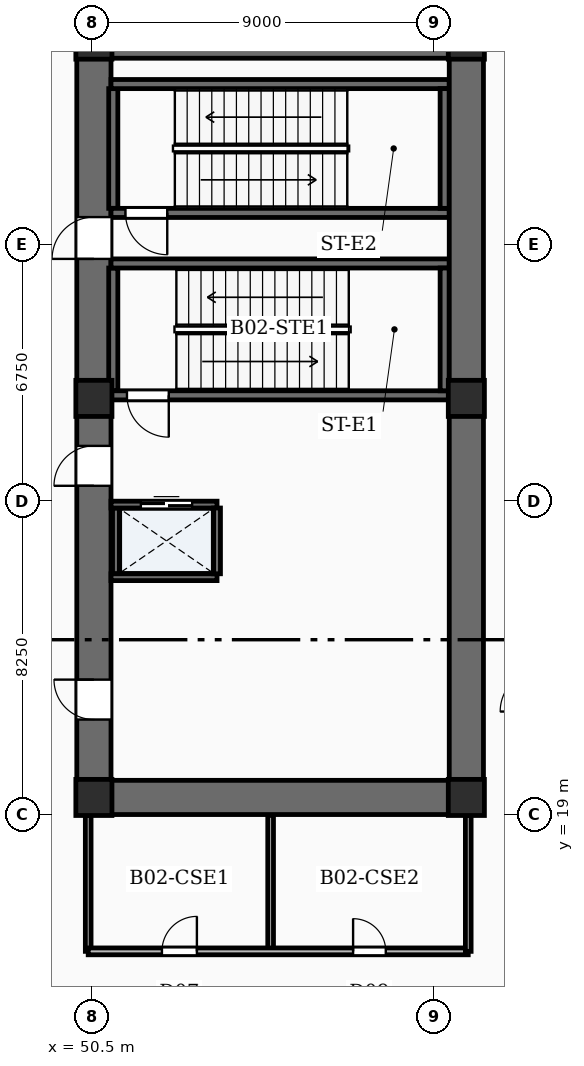
"""IFC4 building model, lengths in metres.
Left out: names, types, materials, properties, quantities, classifications, styles, units other than length and angle.
Written with IfcOpenShell. Run it as: python <this file> out.ifc"""

import sys

from ifc_helpers import new_model, si_unit, direction, frame, frame_2d, origin, origin_2d, place, context, subcontext, project, spatial, rectangle, extrude, element, fill, save


model = new_model("IFC4")
c1 = context("Model", 3, precision=1e-05, world=origin(), true_north=direction((0.0, 1.0)))
c2 = subcontext(c1, "Body", "Model", "MODEL_VIEW")
j1 = project(units=[si_unit("LENGTHUNIT", "METRE"), si_unit("PLANEANGLEUNIT", "RADIAN")], contexts=[c1])
p1 = place(None, origin())
s1 = spatial("IfcSite", under=j1, at=p1, CompositionType="ELEMENT")
p2 = place(p1, origin())
s2 = spatial("IfcBuilding", under=s1, at=p2, CompositionType="ELEMENT")
p3 = place(p2, frame((0.0, 0.0, -10.0)))
s3 = spatial("IfcBuildingStorey", under=s2, at=p3, CompositionType="ELEMENT", Elevation=-10.0)
p4 = place(p3, frame((50.55, 19.0, -0.85), z_axis=(0.0, 0.0, 1.0), x_axis=(0.0, 1.0, 0.0)))
e1 = element("IfcWall", 1, at=p4, inside=s3, PredefinedType="SHEAR", context=c2, shape_type="SweptSolid", body=[
    extrude(rectangle(XDim=20.8, YDim=0.9, at=frame_2d((10.4, 0.0))), origin(), (0.0, 0.0, 1.0), 5.54),
])
p5 = place(p4, frame((2.5, 0.0, 0.85)))
e2 = element("IfcOpeningElement", 2, at=p5, cuts=e1, PredefinedType="OPENING", context=c2, shape_type="SweptSolid", body=[
    extrude(rectangle(XDim=1.05, YDim=2.15, at=frame_2d((0.525, 1.075))), frame((0.0, 0.46, 0.0), z_axis=(0.0, -1.0, 0.0), x_axis=(1.0, 0.0, 0.0)), (0.0, 0.0, 1.0), 0.92),
])
p6 = place(p4, frame((8.65, 0.0, 0.85)))
e3 = element("IfcOpeningElement", 3, at=p6, cuts=e1, PredefinedType="OPENING", context=c2, shape_type="SweptSolid", body=[
    extrude(rectangle(XDim=1.05, YDim=2.15, at=frame_2d((0.525, 1.075))), frame((0.0, 0.46, 0.0), z_axis=(0.0, -1.0, 0.0), x_axis=(1.0, 0.0, 0.0)), (0.0, 0.0, 1.0), 0.92),
])
p7 = place(p4, frame((14.62, 0.0, 0.85)))
e4 = element("IfcOpeningElement", 4, at=p7, cuts=e1, PredefinedType="OPENING", context=c2, shape_type="SweptSolid", body=[
    extrude(rectangle(XDim=1.1, YDim=2.15, at=frame_2d((0.55, 1.075))), frame((0.0, 0.46, 0.0), z_axis=(0.0, -1.0, 0.0), x_axis=(1.0, 0.0, 0.0)), (0.0, 0.0, 1.0), 0.92),
])
p8 = place(p3, frame((60.35, 19.0, -0.85), z_axis=(0.0, 0.0, 1.0), x_axis=(0.0, 1.0, 0.0)))
e5 = element("IfcWall", 5, at=p8, inside=s3, PredefinedType="SHEAR", context=c2, shape_type="SweptSolid", body=[
    extrude(rectangle(XDim=20.8, YDim=0.9, at=frame_2d((10.4, 0.0))), origin(), (0.0, 0.0, 1.0), 5.54),
])
for number, where, z_axis, x_axis in (
    (6, (51.0, 19.45, -0.85), (0.0, 0.0, 1.0), (1.0, 0.0, 0.0)),
    (7, (51.0, 39.35, -0.85), (0.0, 0.0, 1.0), (1.0, 0.0, 0.0)),
):
    element("IfcWall", number, at=place(p3, frame(where, z_axis=z_axis, x_axis=x_axis)), inside=s3, PredefinedType="SHEAR", context=c2, shape_type="SweptSolid", body=[
        extrude(rectangle(XDim=8.9, YDim=0.9, at=frame_2d((4.45, 0.0))), origin(), (0.0, 0.0, 1.0), 5.54),
    ])
for number, where, z_axis, x_axis in (
    (8, (50.55, 19.45, -0.85), (0.0, 0.0, 1.0), (1.0, 0.0, 0.0)),
    (9, (60.35, 19.45, -0.85), (0.0, 0.0, 1.0), (1.0, 0.0, 0.0)),
    (10, (50.55, 29.95, -0.85), (0.0, 0.0, 1.0), (1.0, 0.0, 0.0)),
    (11, (60.35, 29.95, -0.85), (0.0, 0.0, 1.0), (1.0, 0.0, 0.0)),
    (12, (50.55, 39.35, -0.85), (0.0, 0.0, 1.0), (1.0, 0.0, 0.0)),
    (13, (60.35, 39.35, -0.85), (0.0, 0.0, 1.0), (1.0, 0.0, 0.0)),
):
    element("IfcColumn", number, at=place(p3, frame(where, z_axis=z_axis, x_axis=x_axis)), inside=s3, PredefinedType="COLUMN", context=c2, shape_type="SweptSolid", body=[
        extrude(rectangle(XDim=0.95, YDim=0.95, at=origin_2d()), origin(), (0.0, 0.0, 1.0), 5.54),
    ])
p9 = place(p3, frame((59.9, 30.03, 0.0), z_axis=(0.0, 0.0, 1.0), x_axis=(-1.0, 0.0, 0.0)))
e14 = element("IfcWall", 14, at=p9, inside=s3, PredefinedType="SOLIDWALL", context=c2, shape_type="SweptSolid", body=[
    extrude(rectangle(XDim=8.9, YDim=0.24, at=frame_2d((4.45, 0.0))), origin(), (0.0, 0.0, 1.0), 4.69),
])
p10 = place(p9, frame((7.38, 0.0, 0.0)))
e15 = element("IfcOpeningElement", 15, at=p10, cuts=e14, PredefinedType="OPENING", context=c2, shape_type="SweptSolid", body=[
    extrude(rectangle(XDim=1.1, YDim=2.15, at=frame_2d((0.55, 1.075))), frame((0.0, 0.13, 0.0), z_axis=(0.0, -1.0, 0.0), x_axis=(1.0, 0.0, 0.0)), (0.0, 0.0, 1.0), 0.26),
])
p11 = place(p3, frame((51.0, 33.5, 0.0), z_axis=(0.0, 0.0, 1.0), x_axis=(1.0, 0.0, 0.0)))
e16 = element("IfcWall", 16, at=p11, inside=s3, PredefinedType="SOLIDWALL", context=c2, shape_type="SweptSolid", body=[
    extrude(rectangle(XDim=8.9, YDim=0.24, at=frame_2d((4.45, 0.0))), origin(), (0.0, 0.0, 1.0), 4.69),
])
for number, where, z_axis, x_axis in (
    (17, (51.06, 30.15, 0.0), (0.0, 0.0, 1.0), (0.0, 1.0, 0.0)),
    (18, (59.78, 30.15, 0.0), (0.0, 0.0, 1.0), (0.0, 1.0, 0.0)),
):
    element("IfcWall", number, at=place(p3, frame(where, z_axis=z_axis, x_axis=x_axis)), inside=s3, PredefinedType="SOLIDWALL", context=c2, shape_type="SweptSolid", body=[
        extrude(rectangle(XDim=3.23, YDim=0.24, at=frame_2d((1.615, 0.0))), origin(), (0.0, 0.0, 1.0), 4.69),
    ])
p12 = place(p3, frame((59.9, 34.83, 0.0), z_axis=(0.0, 0.0, 1.0), x_axis=(-1.0, 0.0, 0.0)))
e19 = element("IfcWall", 19, at=p12, inside=s3, PredefinedType="SOLIDWALL", context=c2, shape_type="SweptSolid", body=[
    extrude(rectangle(XDim=8.9, YDim=0.24, at=frame_2d((4.45, 0.0))), origin(), (0.0, 0.0, 1.0), 4.69),
])
p13 = place(p12, frame((7.42, 0.0, 0.0)))
e20 = element("IfcOpeningElement", 20, at=p13, cuts=e19, PredefinedType="OPENING", context=c2, shape_type="SweptSolid", body=[
    extrude(rectangle(XDim=1.1, YDim=2.15, at=frame_2d((0.55, 1.075))), frame((0.0, 0.13, 0.0), z_axis=(0.0, -1.0, 0.0), x_axis=(1.0, 0.0, 0.0)), (0.0, 0.0, 1.0), 0.26),
])
p14 = place(p3, frame((51.0, 38.22, 0.0), z_axis=(0.0, 0.0, 1.0), x_axis=(1.0, 0.0, 0.0)))
e21 = element("IfcWall", 21, at=p14, inside=s3, PredefinedType="SOLIDWALL", context=c2, shape_type="SweptSolid", body=[
    extrude(rectangle(XDim=8.9, YDim=0.24, at=frame_2d((4.45, 0.0))), origin(), (0.0, 0.0, 1.0), 4.69),
])
for number, where, z_axis, x_axis in (
    (22, (51.06, 34.95, 0.0), (0.0, 0.0, 1.0), (0.0, 1.0, 0.0)),
    (23, (59.78, 34.95, 0.0), (0.0, 0.0, 1.0), (0.0, 1.0, 0.0)),
):
    element("IfcWall", number, at=place(p3, frame(where, z_axis=z_axis, x_axis=x_axis)), inside=s3, PredefinedType="SOLIDWALL", context=c2, shape_type="SweptSolid", body=[
        extrude(rectangle(XDim=3.15, YDim=0.24, at=frame_2d((1.575, 0.0))), origin(), (0.0, 0.0, 1.0), 4.69),
    ])
p15 = place(p3, frame((51.0, 27.155, 0.0), z_axis=(0.0, 0.0, 1.0), x_axis=(1.0, 0.0, 0.0)))
e24 = element("IfcWall", 24, at=p15, inside=s3, PredefinedType="SOLIDWALL", context=c2, shape_type="SweptSolid", body=[
    extrude(rectangle(XDim=2.79, YDim=0.18, at=frame_2d((1.395, 0.0))), origin(), (0.0, 0.0, 1.0), 4.69),
])
p16 = place(p15, frame((0.785, 0.0, 0.0)))
e25 = element("IfcOpeningElement", 25, at=p16, cuts=e24, PredefinedType="OPENING", context=c2, shape_type="SweptSolid", body=[
    extrude(rectangle(XDim=1.35, YDim=2.3, at=frame_2d((0.675, 1.15))), frame((0.0, 0.1, 0.0), z_axis=(0.0, -1.0, 0.0), x_axis=(1.0, 0.0, 0.0)), (0.0, 0.0, 1.0), 0.2),
])
p17 = place(p3, frame((51.0, 25.245, 0.0), z_axis=(0.0, 0.0, 1.0), x_axis=(1.0, 0.0, 0.0)))
e26 = element("IfcWall", 26, at=p17, inside=s3, PredefinedType="SOLIDWALL", context=c2, shape_type="SweptSolid", body=[
    extrude(rectangle(XDim=2.79, YDim=0.18, at=frame_2d((1.395, 0.0))), origin(), (0.0, 0.0, 1.0), 4.69),
])
for number, where, z_axis, x_axis in (
    (27, (51.13, 25.335, 0.0), (0.0, 0.0, 1.0), (0.0, 1.0, 0.0)),
    (28, (53.79, 25.335, 0.0), (0.0, 0.0, 1.0), (0.0, 1.0, 0.0)),
):
    element("IfcWall", number, at=place(p3, frame(where, z_axis=z_axis, x_axis=x_axis)), inside=s3, PredefinedType="SOLIDWALL", context=c2, shape_type="SweptSolid", body=[
        extrude(rectangle(XDim=1.73, YDim=0.18, at=frame_2d((0.865, 0.0))), origin(), (0.0, 0.0, 1.0), 4.69),
    ])
p18 = place(p3, frame((55.2, 15.4, 0.0), z_axis=(0.0, 0.0, 1.0), x_axis=(0.0, 1.0, 0.0)))
e29 = element("IfcWall", 29, at=p18, inside=s3, PredefinedType="PARTITIONING", context=c2, shape_type="SweptSolid", body=[
    extrude(rectangle(XDim=3.58, YDim=0.15, at=frame_2d((1.79, 0.0))), origin(), (0.0, 0.0, 1.0), 3.75),
])
p19 = place(p3, frame((50.4, 15.4, 0.0), z_axis=(0.0, 0.0, 1.0), x_axis=(1.0, 0.0, 0.0)))
e30 = element("IfcWall", 30, at=p19, inside=s3, PredefinedType="SOLIDWALL", context=c2, shape_type="SweptSolid", body=[
    extrude(rectangle(XDim=10.0, YDim=0.18, at=frame_2d((5.0, 0.0))), origin(), (0.0, 0.0, 1.0), 3.75),
])
p20 = place(p19, frame((1.94, 0.0, 0.0)))
e31 = element("IfcOpeningElement", 31, at=p20, cuts=e30, PredefinedType="OPENING", context=c2, shape_type="SweptSolid", body=[
    extrude(rectangle(XDim=0.92, YDim=2.1, at=frame_2d((0.46, 1.05))), frame((0.0, 0.1, 0.0), z_axis=(0.0, -1.0, 0.0), x_axis=(1.0, 0.0, 0.0)), (0.0, 0.0, 1.0), 0.2),
])
p21 = place(p19, frame((6.97, 0.0, 0.0)))
e32 = element("IfcOpeningElement", 32, at=p21, cuts=e30, PredefinedType="OPENING", context=c2, shape_type="SweptSolid", body=[
    extrude(rectangle(XDim=0.86, YDim=2.05, at=frame_2d((0.43, 1.025))), frame((0.0, 0.1, 0.0), z_axis=(0.0, -1.0, 0.0), x_axis=(1.0, 0.0, 0.0)), (0.0, 0.0, 1.0), 0.2),
])
for number, where, z_axis, x_axis in (
    (33, (50.4, 15.4, 0.0), (0.0, 0.0, 1.0), (0.0, 1.0, 0.0)),
    (34, (60.4, 15.4, 0.0), (0.0, 0.0, 1.0), (0.0, 1.0, 0.0)),
):
    element("IfcWall", number, at=place(p3, frame(where, z_axis=z_axis, x_axis=x_axis)), inside=s3, PredefinedType="PARTITIONING", context=c2, shape_type="SweptSolid", body=[
        extrude(rectangle(XDim=3.58, YDim=0.15, at=frame_2d((1.79, 0.0))), origin(), (0.0, 0.0, 1.0), 3.75),
    ])
p22 = place(p5, origin())
e35 = element("IfcDoor", 35, at=p22, inside=s3, OperationType="SINGLE_SWING_RIGHT", PredefinedType="DOOR", context=c2, shape_type="SweptSolid", body=[
    extrude(rectangle(XDim=1.05, YDim=2.15, at=frame_2d((0.525, 1.075))), frame((0.0, 0.025, 0.0), z_axis=(0.0, -1.0, 0.0), x_axis=(1.0, 0.0, 0.0)), (0.0, 0.0, 1.0), 0.05),
])
fill(e2, e35)
p23 = place(p6, origin())
e36 = element("IfcDoor", 36, at=p23, inside=s3, OperationType="SINGLE_SWING_LEFT", PredefinedType="DOOR", context=c2, shape_type="SweptSolid", body=[
    extrude(rectangle(XDim=1.05, YDim=2.15, at=frame_2d((0.525, 1.075))), frame((0.0, 0.025, 0.0), z_axis=(0.0, -1.0, 0.0), x_axis=(1.0, 0.0, 0.0)), (0.0, 0.0, 1.0), 0.05),
])
fill(e3, e36)
p24 = place(p7, origin())
e37 = element("IfcDoor", 37, at=p24, inside=s3, OperationType="SINGLE_SWING_LEFT", PredefinedType="DOOR", context=c2, shape_type="SweptSolid", body=[
    extrude(rectangle(XDim=1.1, YDim=2.15, at=frame_2d((0.55, 1.075))), frame((0.0, 0.025, 0.0), z_axis=(0.0, -1.0, 0.0), x_axis=(1.0, 0.0, 0.0)), (0.0, 0.0, 1.0), 0.05),
])
fill(e4, e37)
p25 = place(p10, origin())
e38 = element("IfcDoor", 38, at=p25, inside=s3, OperationType="SINGLE_SWING_LEFT", PredefinedType="DOOR", context=c2, shape_type="SweptSolid", body=[
    extrude(rectangle(XDim=1.1, YDim=2.15, at=frame_2d((0.55, 1.075))), frame((0.0, 0.025, 0.0), z_axis=(0.0, -1.0, 0.0), x_axis=(1.0, 0.0, 0.0)), (0.0, 0.0, 1.0), 0.05),
])
fill(e15, e38)
p26 = place(p13, origin())
e39 = element("IfcDoor", 39, at=p26, inside=s3, OperationType="SINGLE_SWING_LEFT", PredefinedType="DOOR", context=c2, shape_type="SweptSolid", body=[
    extrude(rectangle(XDim=1.1, YDim=2.15, at=frame_2d((0.55, 1.075))), frame((0.0, 0.025, 0.0), z_axis=(0.0, -1.0, 0.0), x_axis=(1.0, 0.0, 0.0)), (0.0, 0.0, 1.0), 0.05),
])
fill(e20, e39)
p27 = place(p16, origin())
e40 = element("IfcDoor", 40, at=p27, inside=s3, OperationType="DOUBLE_DOOR_SLIDING", PredefinedType="DOOR", context=c2, shape_type="SweptSolid", body=[
    extrude(rectangle(XDim=1.35, YDim=2.3, at=frame_2d((0.675, 1.15))), frame((0.0, 0.025, 0.0), z_axis=(0.0, -1.0, 0.0), x_axis=(1.0, 0.0, 0.0)), (0.0, 0.0, 1.0), 0.05),
])
fill(e25, e40)
p28 = place(p20, origin())
e41 = element("IfcDoor", 41, at=p28, inside=s3, OperationType="SINGLE_SWING_RIGHT", PredefinedType="DOOR", context=c2, shape_type="SweptSolid", body=[
    extrude(rectangle(XDim=0.92, YDim=2.1, at=frame_2d((0.46, 1.05))), frame((0.0, 0.025, 0.0), z_axis=(0.0, -1.0, 0.0), x_axis=(1.0, 0.0, 0.0)), (0.0, 0.0, 1.0), 0.05),
])
fill(e31, e41)
p29 = place(p21, origin())
e42 = element("IfcDoor", 42, at=p29, inside=s3, OperationType="SINGLE_SWING_LEFT", PredefinedType="DOOR", context=c2, shape_type="SweptSolid", body=[
    extrude(rectangle(XDim=0.86, YDim=2.05, at=frame_2d((0.43, 1.025))), frame((0.0, 0.025, 0.0), z_axis=(0.0, -1.0, 0.0), x_axis=(1.0, 0.0, 0.0)), (0.0, 0.0, 1.0), 0.05),
])
fill(e32, e42)
save(model, sys.argv[1])
